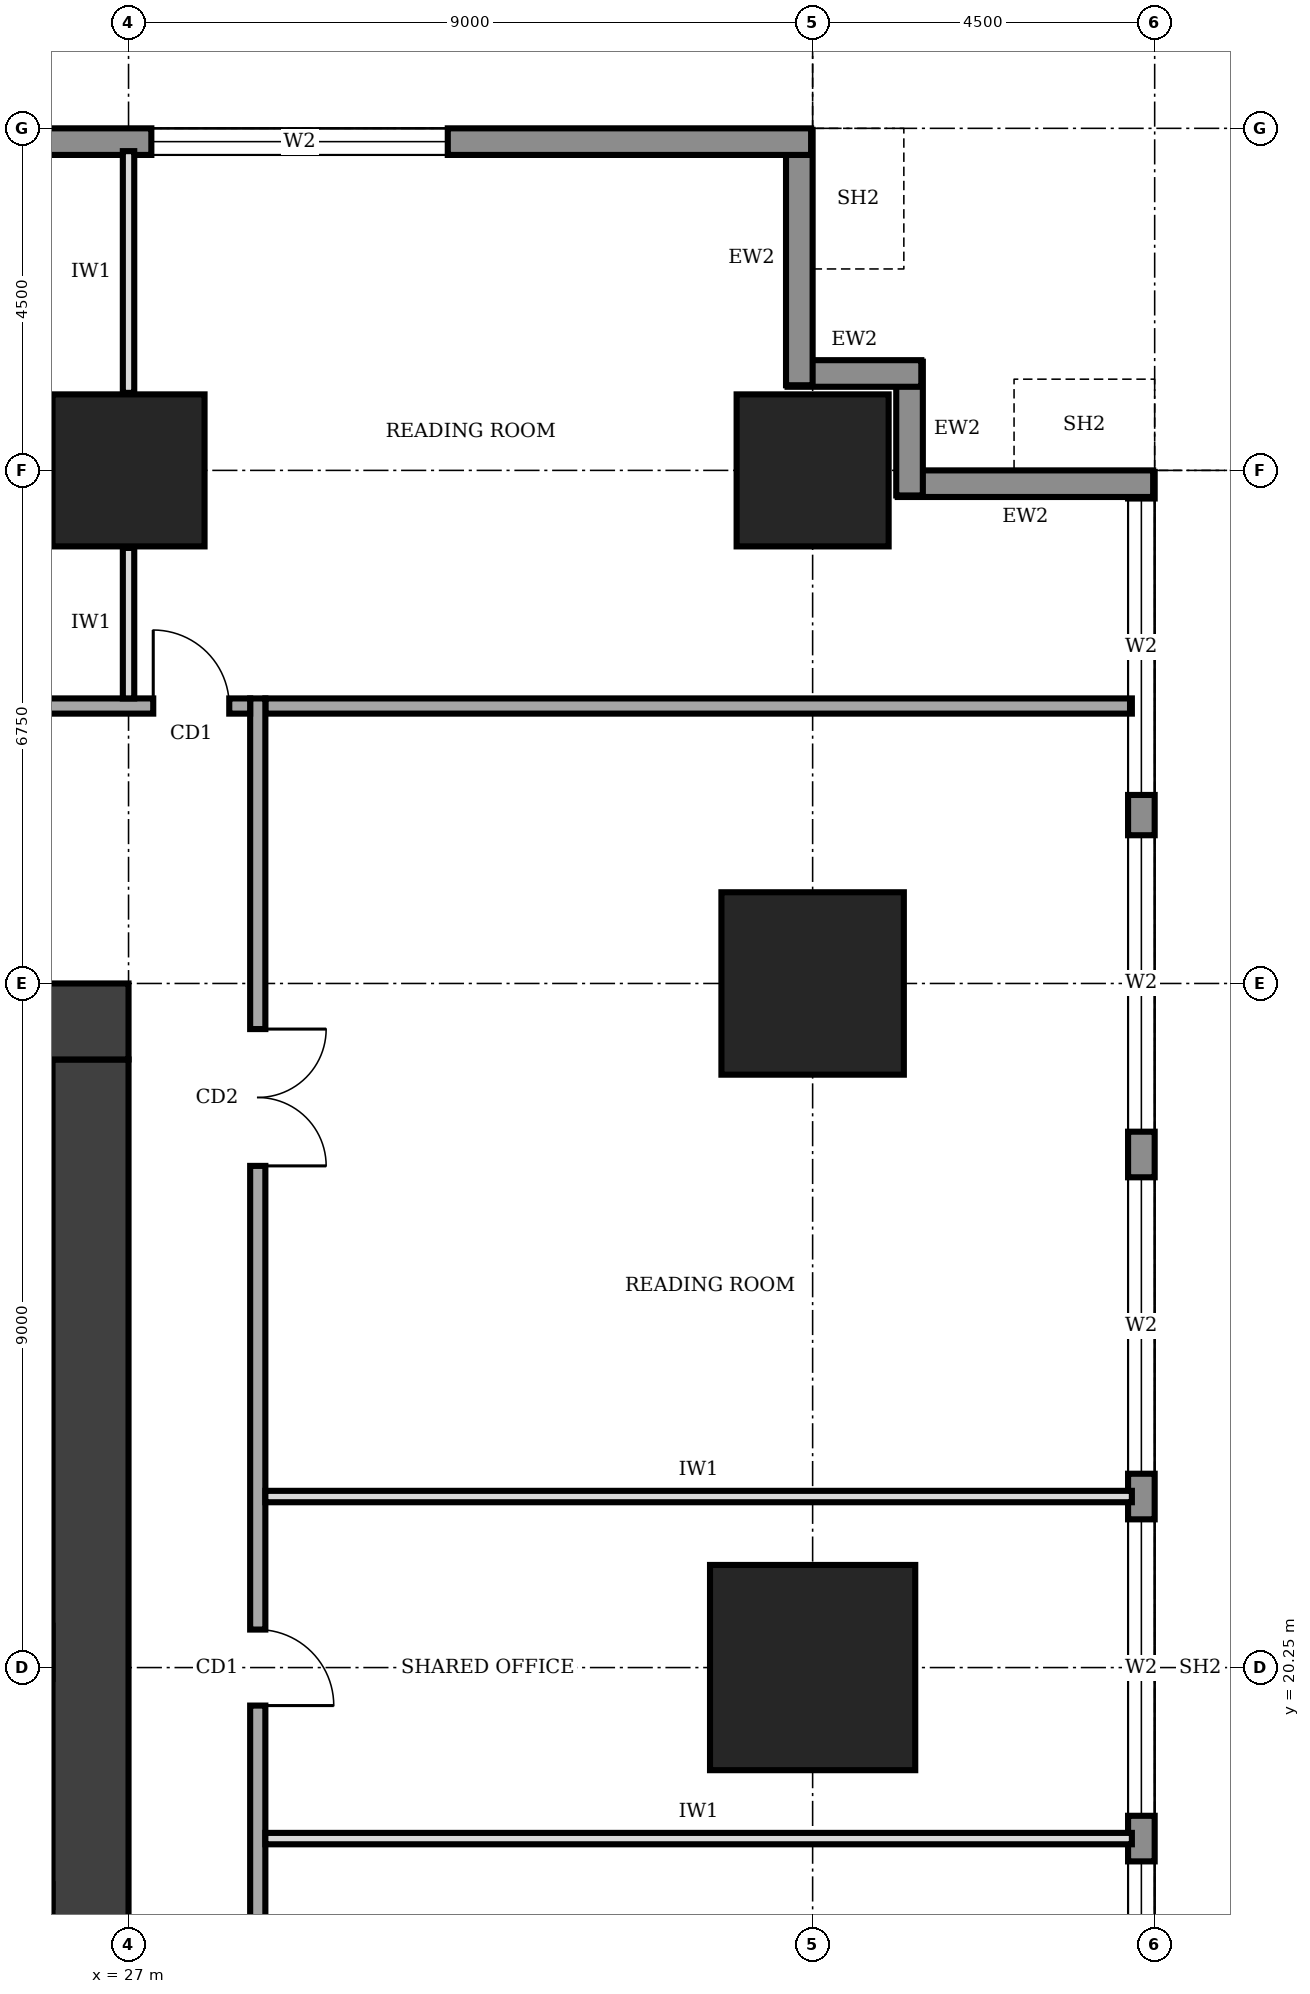
"""IFC4 building model, lengths in metres.
Left out: names, types, materials, properties, quantities, classifications, styles, units other than length and angle.
Written with IfcOpenShell. Run it as: python <this file> out.ifc"""

import sys

from ifc_helpers import new_model, si_unit, direction, frame, frame_2d, origin, origin_2d, place, context, subcontext, project, spatial, rectangle, extrude, element, fill, save


model = new_model("IFC4")
c1 = context("Model", 3, precision=1e-05, world=origin(), true_north=direction((0.0, 1.0)))
c2 = subcontext(c1, "Body", "Model", "MODEL_VIEW")
j1 = project(units=[si_unit("LENGTHUNIT", "METRE"), si_unit("PLANEANGLEUNIT", "RADIAN")], contexts=[c1])
p1 = place(None, origin())
s1 = spatial("IfcSite", under=j1, at=p1, CompositionType="ELEMENT")
p2 = place(p1, origin())
s2 = spatial("IfcBuilding", under=s1, at=p2, CompositionType="ELEMENT")
p3 = place(p2, frame((0.0, 0.0, 73.0)))
s3 = spatial("IfcBuildingStorey", under=s2, at=p3, CompositionType="ELEMENT", Elevation=73.0)
p4 = place(p3, frame((26.5, 12.25, 0.0), z_axis=(0.0, 0.0, 1.0), x_axis=(0.0, 1.0, 0.0)))
e1 = element("IfcWall", 1, at=p4, inside=s3, PredefinedType="SHEAR", context=c2, shape_type="SweptSolid", body=[
    extrude(rectangle(XDim=16.0, YDim=1.0, at=frame_2d((8.0, 0.0))), origin(), (0.0, 0.0, 1.0), 4.0),
])
p5 = place(p3, frame((27.0, 28.75, 0.0), z_axis=(0.0, 0.0, 1.0), x_axis=(-1.0, 0.0, 0.0)))
e2 = element("IfcWall", 2, at=p5, inside=s3, PredefinedType="SHEAR", context=c2, shape_type="SweptSolid", body=[
    extrude(rectangle(XDim=13.5, YDim=1.0, at=frame_2d((6.75, 0.0))), origin(), (0.0, 0.0, 1.0), 4.0),
])
p6 = place(p5, frame((4.75, 0.0, 0.0)))
e3 = element("IfcOpeningElement", 3, at=p6, cuts=e2, PredefinedType="OPENING", context=c2, shape_type="SweptSolid", body=[
    extrude(rectangle(XDim=1.8, YDim=2.1, at=frame_2d((0.9, 1.05))), frame((0.0, 0.51, 0.0), z_axis=(0.0, -1.0, 0.0), x_axis=(1.0, 0.0, 0.0)), (0.0, 0.0, 1.0), 1.02),
])
p7 = place(p3, frame((36.0, 20.25, 0.0), z_axis=(0.0, 0.0, 1.0), x_axis=(1.0, 0.0, 0.0)))
e4 = element("IfcColumn", 4, at=p7, inside=s3, PredefinedType="COLUMN", context=c2, shape_type="SweptSolid", body=[
    extrude(rectangle(XDim=2.7, YDim=2.7, at=origin_2d()), origin(), (0.0, 0.0, 1.0), 4.0),
])
p8 = place(p3, frame((36.0, 29.25, 0.0), z_axis=(0.0, 0.0, 1.0), x_axis=(1.0, 0.0, 0.0)))
e5 = element("IfcColumn", 5, at=p8, inside=s3, PredefinedType="COLUMN", context=c2, shape_type="SweptSolid", body=[
    extrude(rectangle(XDim=2.4, YDim=2.4, at=origin_2d()), origin(), (0.0, 0.0, 1.0), 4.0),
])
for number, where, z_axis, x_axis in (
    (6, (27.0, 36.0, 0.0), (0.0, 0.0, 1.0), (1.0, 0.0, 0.0)),
    (7, (36.0, 36.0, 0.0), (0.0, 0.0, 1.0), (1.0, 0.0, 0.0)),
):
    element("IfcColumn", number, at=place(p3, frame(where, z_axis=z_axis, x_axis=x_axis)), inside=s3, PredefinedType="COLUMN", context=c2, shape_type="SweptSolid", body=[
        extrude(rectangle(XDim=2.0, YDim=2.0, at=origin_2d()), origin(), (0.0, 0.0, 1.0), 4.0),
    ])
p9 = place(p3, frame((40.325, 4.52, 0.0), z_axis=(0.0, 0.0, 1.0), x_axis=(0.0, 1.0, 0.0)))
e8 = element("IfcWall", 8, at=p9, inside=s3, PredefinedType="STANDARD", context=c2, shape_type="SweptSolid", body=[
    extrude(rectangle(XDim=31.46, YDim=0.35, at=frame_2d((15.73, 0.0))), origin(), (0.0, 0.0, 1.0), 3.75),
])
p10 = place(p9, frame((4.78, 0.0, 0.6)))
e9 = element("IfcOpeningElement", 9, at=p10, cuts=e8, PredefinedType="OPENING", context=c2, shape_type="SweptSolid", body=[
    extrude(rectangle(XDim=3.9, YDim=2.6, at=frame_2d((1.95, 1.3))), frame((0.0, 0.185, 0.0), z_axis=(0.0, -1.0, 0.0), x_axis=(1.0, 0.0, 0.0)), (0.0, 0.0, 1.0), 0.37),
])
p11 = place(p9, frame((9.28, 0.0, 0.6)))
e10 = element("IfcOpeningElement", 10, at=p11, cuts=e8, PredefinedType="OPENING", context=c2, shape_type="SweptSolid", body=[
    extrude(rectangle(XDim=3.9, YDim=2.6, at=frame_2d((1.95, 1.3))), frame((0.0, 0.185, 0.0), z_axis=(0.0, -1.0, 0.0), x_axis=(1.0, 0.0, 0.0)), (0.0, 0.0, 1.0), 0.37),
])
p12 = place(p9, frame((13.78, 0.0, 0.6)))
e11 = element("IfcOpeningElement", 11, at=p12, cuts=e8, PredefinedType="OPENING", context=c2, shape_type="SweptSolid", body=[
    extrude(rectangle(XDim=3.9, YDim=2.6, at=frame_2d((1.95, 1.3))), frame((0.0, 0.185, 0.0), z_axis=(0.0, -1.0, 0.0), x_axis=(1.0, 0.0, 0.0)), (0.0, 0.0, 1.0), 0.37),
])
p13 = place(p9, frame((18.28, 0.0, 0.6)))
e12 = element("IfcOpeningElement", 12, at=p13, cuts=e8, PredefinedType="OPENING", context=c2, shape_type="SweptSolid", body=[
    extrude(rectangle(XDim=3.9, YDim=2.6, at=frame_2d((1.95, 1.3))), frame((0.0, 0.185, 0.0), z_axis=(0.0, -1.0, 0.0), x_axis=(1.0, 0.0, 0.0)), (0.0, 0.0, 1.0), 0.37),
])
p14 = place(p9, frame((22.78, 0.0, 0.6)))
e13 = element("IfcOpeningElement", 13, at=p14, cuts=e8, PredefinedType="OPENING", context=c2, shape_type="SweptSolid", body=[
    extrude(rectangle(XDim=3.9, YDim=2.6, at=frame_2d((1.95, 1.3))), frame((0.0, 0.185, 0.0), z_axis=(0.0, -1.0, 0.0), x_axis=(1.0, 0.0, 0.0)), (0.0, 0.0, 1.0), 0.37),
])
p15 = place(p9, frame((27.21, 0.0, 0.6)))
e14 = element("IfcOpeningElement", 14, at=p15, cuts=e8, PredefinedType="OPENING", context=c2, shape_type="SweptSolid", body=[
    extrude(rectangle(XDim=3.9, YDim=2.6, at=frame_2d((1.95, 1.3))), frame((0.0, 0.185, 0.0), z_axis=(0.0, -1.0, 0.0), x_axis=(1.0, 0.0, 0.0)), (0.0, 0.0, 1.0), 0.37),
])
p16 = place(p3, frame((40.48, 35.825, 0.0), z_axis=(0.0, 0.0, 1.0), x_axis=(-1.0, 0.0, 0.0)))
e15 = element("IfcWall", 15, at=p16, inside=s3, PredefinedType="STANDARD", context=c2, shape_type="SweptSolid", body=[
    extrude(rectangle(XDim=3.36, YDim=0.35, at=frame_2d((1.68, 0.0))), origin(), (0.0, 0.0, 1.0), 2.75),
])
for number, where, z_axis, x_axis in (
    (16, (37.275, 35.67, 0.0), (0.0, 0.0, 1.0), (0.0, 1.0, 0.0)),
    (17, (37.43, 37.275, 0.0), (0.0, 0.0, 1.0), (-1.0, 0.0, 0.0)),
):
    element("IfcWall", number, at=place(p3, frame(where, z_axis=z_axis, x_axis=x_axis)), inside=s3, PredefinedType="STANDARD", context=c2, shape_type="SweptSolid", body=[
        extrude(rectangle(XDim=1.76, YDim=0.35, at=frame_2d((0.88, 0.0))), origin(), (0.0, 0.0, 1.0), 3.75),
    ])
p17 = place(p3, frame((35.825, 37.12, 0.0), z_axis=(0.0, 0.0, 1.0), x_axis=(0.0, 1.0, 0.0)))
e18 = element("IfcWall", 18, at=p17, inside=s3, PredefinedType="STANDARD", context=c2, shape_type="SweptSolid", body=[
    extrude(rectangle(XDim=3.36, YDim=0.35, at=frame_2d((1.68, 0.0))), origin(), (0.0, 0.0, 1.0), 2.75),
])
p18 = place(p3, frame((35.98, 40.325, 0.0), z_axis=(0.0, 0.0, 1.0), x_axis=(-1.0, 0.0, 0.0)))
e19 = element("IfcWall", 19, at=p18, inside=s3, PredefinedType="STANDARD", context=c2, shape_type="SweptSolid", body=[
    extrude(rectangle(XDim=31.46, YDim=0.35, at=frame_2d((15.73, 0.0))), origin(), (0.0, 0.0, 1.0), 3.75),
])
p19 = place(p18, frame((27.21, 0.0, 0.6)))
e20 = element("IfcOpeningElement", 20, at=p19, cuts=e19, PredefinedType="OPENING", context=c2, shape_type="SweptSolid", body=[
    extrude(rectangle(XDim=3.9, YDim=2.6, at=frame_2d((1.95, 1.3))), frame((0.0, 0.185, 0.0), z_axis=(0.0, -1.0, 0.0), x_axis=(1.0, 0.0, 0.0)), (0.0, 0.0, 1.0), 0.37),
])
p20 = place(p18, frame((22.78, 0.0, 0.6)))
e21 = element("IfcOpeningElement", 21, at=p20, cuts=e19, PredefinedType="OPENING", context=c2, shape_type="SweptSolid", body=[
    extrude(rectangle(XDim=3.9, YDim=2.6, at=frame_2d((1.95, 1.3))), frame((0.0, 0.185, 0.0), z_axis=(0.0, -1.0, 0.0), x_axis=(1.0, 0.0, 0.0)), (0.0, 0.0, 1.0), 0.37),
])
p21 = place(p18, frame((4.78, 0.0, 0.6)))
e22 = element("IfcOpeningElement", 22, at=p21, cuts=e19, PredefinedType="OPENING", context=c2, shape_type="SweptSolid", body=[
    extrude(rectangle(XDim=3.9, YDim=2.6, at=frame_2d((1.95, 1.3))), frame((0.0, 0.185, 0.0), z_axis=(0.0, -1.0, 0.0), x_axis=(1.0, 0.0, 0.0)), (0.0, 0.0, 1.0), 0.37),
])
p22 = place(p3, frame((28.7, 7.7, 0.0), z_axis=(0.0, 0.0, 1.0), x_axis=(0.0, 1.0, 0.0)))
e23 = element("IfcWall", 23, at=p22, inside=s3, PredefinedType="SOLIDWALL", context=c2, shape_type="SweptSolid", body=[
    extrude(rectangle(XDim=25.3, YDim=0.2, at=frame_2d((12.65, 0.0))), origin(), (0.0, 0.0, 1.0), 3.75),
])
p23 = place(p22, frame((4.15, 0.0, 0.0)))
e24 = element("IfcOpeningElement", 24, at=p23, cuts=e23, PredefinedType="OPENING", context=c2, shape_type="SweptSolid", body=[
    extrude(rectangle(XDim=1.8, YDim=2.1, at=frame_2d((0.9, 1.05))), frame((0.0, 0.11, 0.0), z_axis=(0.0, -1.0, 0.0), x_axis=(1.0, 0.0, 0.0)), (0.0, 0.0, 1.0), 0.22),
])
p24 = place(p22, frame((12.05, 0.0, 0.0)))
e25 = element("IfcOpeningElement", 25, at=p24, cuts=e23, PredefinedType="OPENING", context=c2, shape_type="SweptSolid", body=[
    extrude(rectangle(XDim=1.0, YDim=2.1, at=frame_2d((0.5, 1.05))), frame((0.0, 0.11, 0.0), z_axis=(0.0, -1.0, 0.0), x_axis=(1.0, 0.0, 0.0)), (0.0, 0.0, 1.0), 0.22),
])
p25 = place(p22, frame((19.15, 0.0, 0.0)))
e26 = element("IfcOpeningElement", 26, at=p25, cuts=e23, PredefinedType="OPENING", context=c2, shape_type="SweptSolid", body=[
    extrude(rectangle(XDim=1.8, YDim=2.1, at=frame_2d((0.9, 1.05))), frame((0.0, 0.11, 0.0), z_axis=(0.0, -1.0, 0.0), x_axis=(1.0, 0.0, 0.0)), (0.0, 0.0, 1.0), 0.22),
])
p26 = place(p3, frame((28.6, 32.9, 0.0), z_axis=(0.0, 0.0, 1.0), x_axis=(-1.0, 0.0, 0.0)))
e27 = element("IfcWall", 27, at=p26, inside=s3, PredefinedType="SOLIDWALL", context=c2, shape_type="SweptSolid", body=[
    extrude(rectangle(XDim=16.9, YDim=0.2, at=frame_2d((8.45, 0.0))), origin(), (0.0, 0.0, 1.0), 3.75),
])
p27 = place(p26, frame((15.425, 0.0, 0.0)))
e28 = element("IfcOpeningElement", 28, at=p27, cuts=e27, PredefinedType="OPENING", context=c2, shape_type="SweptSolid", body=[
    extrude(rectangle(XDim=1.0, YDim=2.1, at=frame_2d((0.5, 1.05))), frame((0.0, 0.11, 0.0), z_axis=(0.0, -1.0, 0.0), x_axis=(1.0, 0.0, 0.0)), (0.0, 0.0, 1.0), 0.22),
])
p28 = place(p26, frame((12.35, 0.0, 0.0)))
e29 = element("IfcOpeningElement", 29, at=p28, cuts=e27, PredefinedType="OPENING", context=c2, shape_type="SweptSolid", body=[
    extrude(rectangle(XDim=1.0, YDim=2.1, at=frame_2d((0.5, 1.05))), frame((0.0, 0.11, 0.0), z_axis=(0.0, -1.0, 0.0), x_axis=(1.0, 0.0, 0.0)), (0.0, 0.0, 1.0), 0.22),
])
p29 = place(p26, frame((5.6, 0.0, 0.0)))
e30 = element("IfcOpeningElement", 30, at=p29, cuts=e27, PredefinedType="OPENING", context=c2, shape_type="SweptSolid", body=[
    extrude(rectangle(XDim=1.0, YDim=2.1, at=frame_2d((0.5, 1.05))), frame((0.0, 0.11, 0.0), z_axis=(0.0, -1.0, 0.0), x_axis=(1.0, 0.0, 0.0)), (0.0, 0.0, 1.0), 0.22),
])
p30 = place(p26, frame((0.275, 0.0, 0.0)))
e31 = element("IfcOpeningElement", 31, at=p30, cuts=e27, PredefinedType="OPENING", context=c2, shape_type="SweptSolid", body=[
    extrude(rectangle(XDim=1.0, YDim=2.1, at=frame_2d((0.5, 1.05))), frame((0.0, 0.11, 0.0), z_axis=(0.0, -1.0, 0.0), x_axis=(1.0, 0.0, 0.0)), (0.0, 0.0, 1.0), 0.22),
])
p31 = place(p3, frame((28.8, 32.9, 0.0), z_axis=(0.0, 0.0, 1.0), x_axis=(1.0, 0.0, 0.0)))
e32 = element("IfcWall", 32, at=p31, inside=s3, PredefinedType="SOLIDWALL", context=c2, shape_type="SweptSolid", body=[
    extrude(rectangle(XDim=11.4, YDim=0.2, at=frame_2d((5.7, 0.0))), origin(), (0.0, 0.0, 1.0), 3.75),
])
p32 = place(p3, frame((27.0, 33.0, 0.0), z_axis=(0.0, 0.0, 1.0), x_axis=(0.0, 1.0, 0.0)))
e33 = element("IfcWall", 33, at=p32, inside=s3, PredefinedType="PARTITIONING", context=c2, shape_type="SweptSolid", body=[
    extrude(rectangle(XDim=1.98, YDim=0.15, at=frame_2d((0.99, 0.0))), origin(), (0.0, 0.0, 1.0), 3.75),
])
p33 = place(p3, frame((27.0, 37.02, 0.0), z_axis=(0.0, 0.0, 1.0), x_axis=(0.0, 1.0, 0.0)))
e34 = element("IfcWall", 34, at=p33, inside=s3, PredefinedType="PARTITIONING", context=c2, shape_type="SweptSolid", body=[
    extrude(rectangle(XDim=3.18, YDim=0.15, at=frame_2d((1.59, 0.0))), origin(), (0.0, 0.0, 1.0), 2.75),
])
for number, where, z_axis, x_axis in (
    (35, (28.8, 18.0, 0.0), (0.0, 0.0, 1.0), (1.0, 0.0, 0.0)),
    (36, (28.8, 22.5, 0.0), (0.0, 0.0, 1.0), (1.0, 0.0, 0.0)),
):
    element("IfcWall", number, at=place(p3, frame(where, z_axis=z_axis, x_axis=x_axis)), inside=s3, PredefinedType="PARTITIONING", context=c2, shape_type="SweptSolid", body=[
        extrude(rectangle(XDim=11.4, YDim=0.15, at=frame_2d((5.7, 0.0))), origin(), (0.0, 0.0, 1.0), 3.75),
    ])
p34 = place(p11, origin())
e37 = element("IfcWindow", 37, at=p34, inside=s3, PartitioningType="SINGLE_PANEL", PredefinedType="WINDOW", context=c2, shape_type="SweptSolid", body=[
    extrude(rectangle(XDim=3.9, YDim=2.6, at=frame_2d((1.95, 1.3))), frame((0.0, 0.03, 0.0), z_axis=(0.0, -1.0, 0.0), x_axis=(1.0, 0.0, 0.0)), (0.0, 0.0, 1.0), 0.06),
])
fill(e10, e37)
p35 = place(p12, origin())
e38 = element("IfcWindow", 38, at=p35, inside=s3, PartitioningType="SINGLE_PANEL", PredefinedType="WINDOW", context=c2, shape_type="SweptSolid", body=[
    extrude(rectangle(XDim=3.9, YDim=2.6, at=frame_2d((1.95, 1.3))), frame((0.0, 0.03, 0.0), z_axis=(0.0, -1.0, 0.0), x_axis=(1.0, 0.0, 0.0)), (0.0, 0.0, 1.0), 0.06),
])
fill(e11, e38)
p36 = place(p13, origin())
e39 = element("IfcWindow", 39, at=p36, inside=s3, PartitioningType="SINGLE_PANEL", PredefinedType="WINDOW", context=c2, shape_type="SweptSolid", body=[
    extrude(rectangle(XDim=3.9, YDim=2.6, at=frame_2d((1.95, 1.3))), frame((0.0, 0.03, 0.0), z_axis=(0.0, -1.0, 0.0), x_axis=(1.0, 0.0, 0.0)), (0.0, 0.0, 1.0), 0.06),
])
fill(e12, e39)
p37 = place(p14, origin())
e40 = element("IfcWindow", 40, at=p37, inside=s3, PartitioningType="SINGLE_PANEL", PredefinedType="WINDOW", context=c2, shape_type="SweptSolid", body=[
    extrude(rectangle(XDim=3.9, YDim=2.6, at=frame_2d((1.95, 1.3))), frame((0.0, 0.03, 0.0), z_axis=(0.0, -1.0, 0.0), x_axis=(1.0, 0.0, 0.0)), (0.0, 0.0, 1.0), 0.06),
])
fill(e13, e40)
p38 = place(p15, origin())
e41 = element("IfcWindow", 41, at=p38, inside=s3, PartitioningType="SINGLE_PANEL", PredefinedType="WINDOW", context=c2, shape_type="SweptSolid", body=[
    extrude(rectangle(XDim=3.9, YDim=2.6, at=frame_2d((1.95, 1.3))), frame((0.0, 0.03, 0.0), z_axis=(0.0, -1.0, 0.0), x_axis=(1.0, 0.0, 0.0)), (0.0, 0.0, 1.0), 0.06),
])
fill(e14, e41)
p39 = place(p21, origin())
e42 = element("IfcWindow", 42, at=p39, inside=s3, PartitioningType="SINGLE_PANEL", PredefinedType="WINDOW", context=c2, shape_type="SweptSolid", body=[
    extrude(rectangle(XDim=3.9, YDim=2.6, at=frame_2d((1.95, 1.3))), frame((0.0, 0.03, 0.0), z_axis=(0.0, -1.0, 0.0), x_axis=(1.0, 0.0, 0.0)), (0.0, 0.0, 1.0), 0.06),
])
fill(e22, e42)
p40 = place(p24, frame((1.0, 0.0, 0.0), z_axis=(0.0, 0.0, 1.0), x_axis=(-1.0, 0.0, 0.0)))
e43 = element("IfcDoor", 43, at=p40, inside=s3, OperationType="SINGLE_SWING_RIGHT", PredefinedType="DOOR", context=c2, shape_type="SweptSolid", body=[
    extrude(rectangle(XDim=1.0, YDim=2.1, at=frame_2d((0.5, 1.05))), frame((0.0, 0.025, 0.0), z_axis=(0.0, -1.0, 0.0), x_axis=(1.0, 0.0, 0.0)), (0.0, 0.0, 1.0), 0.05),
])
fill(e25, e43)
p41 = place(p25, frame((1.8, 0.0, 0.0), z_axis=(0.0, 0.0, 1.0), x_axis=(-1.0, 0.0, 0.0)))
e44 = element("IfcDoor", 44, at=p41, inside=s3, OperationType="DOUBLE_DOOR_SINGLE_SWING", PredefinedType="DOOR", context=c2, shape_type="SweptSolid", body=[
    extrude(rectangle(XDim=1.8, YDim=2.1, at=frame_2d((0.9, 1.05))), frame((0.0, 0.025, 0.0), z_axis=(0.0, -1.0, 0.0), x_axis=(1.0, 0.0, 0.0)), (0.0, 0.0, 1.0), 0.05),
])
fill(e26, e44)
p42 = place(p30, frame((1.0, 0.0, 0.0), z_axis=(0.0, 0.0, 1.0), x_axis=(-1.0, 0.0, 0.0)))
e45 = element("IfcDoor", 45, at=p42, inside=s3, OperationType="SINGLE_SWING_LEFT", PredefinedType="DOOR", context=c2, shape_type="SweptSolid", body=[
    extrude(rectangle(XDim=1.0, YDim=2.1, at=frame_2d((0.5, 1.05))), frame((0.0, 0.025, 0.0), z_axis=(0.0, -1.0, 0.0), x_axis=(1.0, 0.0, 0.0)), (0.0, 0.0, 1.0), 0.05),
])
fill(e31, e45)
save(model, sys.argv[1])
